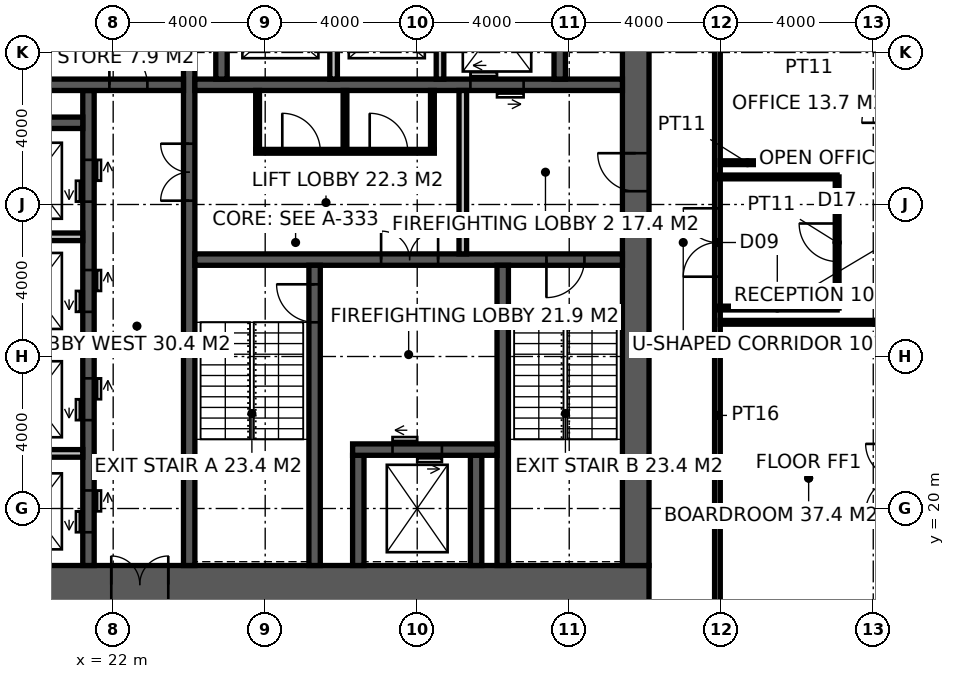
"""IFC4 building model, lengths in metres.
Left out: names, types, materials, properties, quantities, classifications, styles, units other than length and angle.
Written with IfcOpenShell. Run it as: python <this file> out.ifc"""

import sys

from ifc_helpers import new_model, si_unit, direction, frame, frame_2d, origin, place, context, subcontext, project, spatial, rectangle, extrude, element, fill, save


model = new_model("IFC4")
c1 = context("Model", 3, precision=1e-05, world=origin(), true_north=direction((0.0, 1.0)))
c2 = subcontext(c1, "Body", "Model", "MODEL_VIEW")
j1 = project(units=[si_unit("LENGTHUNIT", "METRE"), si_unit("PLANEANGLEUNIT", "RADIAN")], contexts=[c1])
p1 = place(None, origin())
s1 = spatial("IfcSite", under=j1, at=p1, CompositionType="ELEMENT")
p2 = place(p1, origin())
s2 = spatial("IfcBuilding", under=s1, at=p2, CompositionType="ELEMENT")
p3 = place(p2, frame((0.0, 0.0, 199.8)))
s3 = spatial("IfcBuildingStorey", under=s2, at=p3, CompositionType="ELEMENT", Elevation=199.8)
p4 = place(p3, frame((18.5, 18.0, -0.15), z_axis=(0.0, 0.0, 1.0), x_axis=(1.0, 0.0, 0.0)))
e1 = element("IfcWall", 1, at=p4, inside=s3, PredefinedType="SHEAR", context=c2, shape_type="SweptSolid", body=[
    extrude(rectangle(XDim=17.6, YDim=1.0, at=frame_2d((8.8, 0.0))), origin(), (0.0, 0.0, 1.0), 4.0),
])
p5 = place(p4, frame((3.45, 0.0, 0.15)))
e2 = element("IfcOpeningElement", 2, at=p5, cuts=e1, PredefinedType="OPENING", context=c2, shape_type="SweptSolid", body=[
    extrude(rectangle(XDim=1.5, YDim=2.4, at=frame_2d((0.75, 1.2))), frame((0.0, 0.51, 0.0), z_axis=(0.0, -1.0, 0.0), x_axis=(1.0, 0.0, 0.0)), (0.0, 0.0, 1.0), 1.02),
])
p6 = place(p3, frame((35.75, 18.5, -0.15), z_axis=(0.0, 0.0, 1.0), x_axis=(0.0, 1.0, 0.0)))
e3 = element("IfcWall", 3, at=p6, inside=s3, PredefinedType="SHEAR", context=c2, shape_type="SweptSolid", body=[
    extrude(rectangle(XDim=17.0, YDim=0.7, at=frame_2d((8.5, 0.0))), origin(), (0.0, 0.0, 1.0), 4.0),
])
p7 = place(p6, frame((9.85, 0.0, 0.15)))
e4 = element("IfcOpeningElement", 4, at=p7, cuts=e3, PredefinedType="OPENING", context=c2, shape_type="SweptSolid", body=[
    extrude(rectangle(XDim=1.0, YDim=2.2, at=frame_2d((0.5, 1.1))), frame((0.0, 0.36, 0.0), z_axis=(0.0, -1.0, 0.0), x_axis=(1.0, 0.0, 0.0)), (0.0, 0.0, 1.0), 0.72),
])
p8 = place(p3, frame((24.0, 18.5, -0.15), z_axis=(0.0, 0.0, 1.0), x_axis=(0.0, 1.0, 0.0)))
e5 = element("IfcWall", 5, at=p8, inside=s3, PredefinedType="SHEAR", context=c2, shape_type="SweptSolid", body=[
    extrude(rectangle(XDim=17.0, YDim=0.3, at=frame_2d((8.5, 0.0))), origin(), (0.0, 0.0, 1.0), 4.0),
])
p9 = place(p8, frame((9.6, 0.0, 0.15)))
e6 = element("IfcOpeningElement", 6, at=p9, cuts=e5, PredefinedType="OPENING", context=c2, shape_type="SweptSolid", body=[
    extrude(rectangle(XDim=1.5, YDim=2.4, at=frame_2d((0.75, 1.2))), frame((0.0, 0.16, 0.0), z_axis=(0.0, -1.0, 0.0), x_axis=(1.0, 0.0, 0.0)), (0.0, 0.0, 1.0), 0.32),
])
p10 = place(p3, frame((24.15, 26.55, -0.15), z_axis=(0.0, 0.0, 1.0), x_axis=(1.0, 0.0, 0.0)))
e7 = element("IfcWall", 7, at=p10, inside=s3, PredefinedType="SHEAR", context=c2, shape_type="SweptSolid", body=[
    extrude(rectangle(XDim=11.25, YDim=0.3, at=frame_2d((5.625, 0.0))), origin(), (0.0, 0.0, 1.0), 4.0),
])
p11 = place(p10, frame((9.25, 0.0, 0.15)))
e8 = element("IfcOpeningElement", 8, at=p11, cuts=e7, PredefinedType="OPENING", context=c2, shape_type="SweptSolid", body=[
    extrude(rectangle(XDim=1.0, YDim=2.2, at=frame_2d((0.5, 1.1))), frame((0.0, 0.16, 0.0), z_axis=(0.0, -1.0, 0.0), x_axis=(1.0, 0.0, 0.0)), (0.0, 0.0, 1.0), 0.32),
])
p12 = place(p10, frame((4.9, 0.0, 0.15)))
e9 = element("IfcOpeningElement", 9, at=p12, cuts=e7, PredefinedType="OPENING", context=c2, shape_type="SweptSolid", body=[
    extrude(rectangle(XDim=1.5, YDim=2.4, at=frame_2d((0.75, 1.2))), frame((0.0, 0.16, 0.0), z_axis=(0.0, -1.0, 0.0), x_axis=(1.0, 0.0, 0.0)), (0.0, 0.0, 1.0), 0.32),
])
p13 = place(p3, frame((27.3, 18.5, -0.15), z_axis=(0.0, 0.0, 1.0), x_axis=(0.0, 1.0, 0.0)))
e10 = element("IfcWall", 10, at=p13, inside=s3, PredefinedType="SHEAR", context=c2, shape_type="SweptSolid", body=[
    extrude(rectangle(XDim=7.9, YDim=0.3, at=frame_2d((3.95, 0.0))), origin(), (0.0, 0.0, 1.0), 4.0),
])
p14 = place(p13, frame((6.4, 0.0, 0.15)))
e11 = element("IfcOpeningElement", 11, at=p14, cuts=e10, PredefinedType="OPENING", context=c2, shape_type="SweptSolid", body=[
    extrude(rectangle(XDim=1.0, YDim=2.2, at=frame_2d((0.5, 1.1))), frame((0.0, 0.16, 0.0), z_axis=(0.0, -1.0, 0.0), x_axis=(1.0, 0.0, 0.0)), (0.0, 0.0, 1.0), 0.32),
])
p15 = place(p3, frame((32.25, 18.5, -0.15), z_axis=(0.0, 0.0, 1.0), x_axis=(0.0, 1.0, 0.0)))
e12 = element("IfcWall", 12, at=p15, inside=s3, PredefinedType="SHEAR", context=c2, shape_type="SweptSolid", body=[
    extrude(rectangle(XDim=7.9, YDim=0.3, at=frame_2d((3.95, 0.0))), origin(), (0.0, 0.0, 1.0), 4.0),
])
for number, where, z_axis, x_axis in (
    (13, (28.45, 18.5, -0.15), (0.0, 0.0, 1.0), (0.0, 1.0, 0.0)),
    (14, (31.55, 18.5, -0.15), (0.0, 0.0, 1.0), (0.0, 1.0, 0.0)),
):
    element("IfcWall", number, at=place(p3, frame(where, z_axis=z_axis, x_axis=x_axis)), inside=s3, PredefinedType="SHEAR", context=c2, shape_type="SweptSolid", body=[
        extrude(rectangle(XDim=2.9, YDim=0.3, at=frame_2d((1.45, 0.0))), origin(), (0.0, 0.0, 1.0), 4.0),
    ])
p16 = place(p3, frame((28.3, 21.55, -0.15), z_axis=(0.0, 0.0, 1.0), x_axis=(1.0, 0.0, 0.0)))
e15 = element("IfcWall", 15, at=p16, inside=s3, PredefinedType="SHEAR", context=c2, shape_type="SweptSolid", body=[
    extrude(rectangle(XDim=3.8, YDim=0.3, at=frame_2d((1.9, 0.0))), origin(), (0.0, 0.0, 1.0), 4.0),
])
p17 = place(p16, frame((1.05, 0.0, 0.15)))
e16 = element("IfcOpeningElement", 16, at=p17, cuts=e15, PredefinedType="OPENING", context=c2, shape_type="SweptSolid", body=[
    extrude(rectangle(XDim=1.3, YDim=2.4, at=frame_2d((0.65, 1.2))), frame((0.0, 0.16, 0.0), z_axis=(0.0, -1.0, 0.0), x_axis=(1.0, 0.0, 0.0)), (0.0, 0.0, 1.0), 0.32),
])
p18 = place(p3, frame((24.15, 31.15, -0.15), z_axis=(0.0, 0.0, 1.0), x_axis=(1.0, 0.0, 0.0)))
e17 = element("IfcWall", 17, at=p18, inside=s3, PredefinedType="SHEAR", context=c2, shape_type="SweptSolid", body=[
    extrude(rectangle(XDim=11.25, YDim=0.3, at=frame_2d((5.625, 0.0))), origin(), (0.0, 0.0, 1.0), 4.0),
])
p19 = place(p18, frame((7.25, 0.0, 0.15)))
e18 = element("IfcOpeningElement", 18, at=p19, cuts=e17, PredefinedType="OPENING", context=c2, shape_type="SweptSolid", body=[
    extrude(rectangle(XDim=1.4, YDim=2.4, at=frame_2d((0.7, 1.2))), frame((0.0, 0.16, 0.0), z_axis=(0.0, -1.0, 0.0), x_axis=(1.0, 0.0, 0.0)), (0.0, 0.0, 1.0), 0.32),
])
p20 = place(p3, frame((21.35, 18.5, -0.15), z_axis=(0.0, 0.0, 1.0), x_axis=(0.0, 1.0, 0.0)))
e19 = element("IfcWall", 19, at=p20, inside=s3, PredefinedType="SHEAR", context=c2, shape_type="SweptSolid", body=[
    extrude(rectangle(XDim=12.5, YDim=0.3, at=frame_2d((6.25, 0.0))), origin(), (0.0, 0.0, 1.0), 4.0),
])
p21 = place(p20, frame((0.875, 0.0, 0.15)))
e20 = element("IfcOpeningElement", 20, at=p21, cuts=e19, PredefinedType="OPENING", context=c2, shape_type="SweptSolid", body=[
    extrude(rectangle(XDim=1.1, YDim=2.2, at=frame_2d((0.55, 1.1))), frame((0.0, 0.16, 0.0), z_axis=(0.0, -1.0, 0.0), x_axis=(1.0, 0.0, 0.0)), (0.0, 0.0, 1.0), 0.32),
])
p22 = place(p20, frame((3.825, 0.0, 0.15)))
e21 = element("IfcOpeningElement", 21, at=p22, cuts=e19, PredefinedType="OPENING", context=c2, shape_type="SweptSolid", body=[
    extrude(rectangle(XDim=1.1, YDim=2.2, at=frame_2d((0.55, 1.1))), frame((0.0, 0.16, 0.0), z_axis=(0.0, -1.0, 0.0), x_axis=(1.0, 0.0, 0.0)), (0.0, 0.0, 1.0), 0.32),
])
p23 = place(p20, frame((6.675, 0.0, 0.15)))
e22 = element("IfcOpeningElement", 22, at=p23, cuts=e19, PredefinedType="OPENING", context=c2, shape_type="SweptSolid", body=[
    extrude(rectangle(XDim=1.1, YDim=2.2, at=frame_2d((0.55, 1.1))), frame((0.0, 0.16, 0.0), z_axis=(0.0, -1.0, 0.0), x_axis=(1.0, 0.0, 0.0)), (0.0, 0.0, 1.0), 0.32),
])
p24 = place(p20, frame((9.575, 0.0, 0.15)))
e23 = element("IfcOpeningElement", 23, at=p24, cuts=e19, PredefinedType="OPENING", context=c2, shape_type="SweptSolid", body=[
    extrude(rectangle(XDim=1.1, YDim=2.2, at=frame_2d((0.55, 1.1))), frame((0.0, 0.16, 0.0), z_axis=(0.0, -1.0, 0.0), x_axis=(1.0, 0.0, 0.0)), (0.0, 0.0, 1.0), 0.32),
])
p25 = place(p3, frame((18.5, 31.15, -0.15), z_axis=(0.0, 0.0, 1.0), x_axis=(1.0, 0.0, 0.0)))
e24 = element("IfcWall", 24, at=p25, inside=s3, PredefinedType="SHEAR", context=c2, shape_type="SweptSolid", body=[
    extrude(rectangle(XDim=5.35, YDim=0.3, at=frame_2d((2.675, 0.0))), origin(), (0.0, 0.0, 1.0), 4.0),
])
p26 = place(p25, frame((3.4, 0.0, 0.15)))
e25 = element("IfcOpeningElement", 25, at=p26, cuts=e24, PredefinedType="OPENING", context=c2, shape_type="SweptSolid", body=[
    extrude(rectangle(XDim=1.0, YDim=2.2, at=frame_2d((0.5, 1.1))), frame((0.0, 0.16, 0.0), z_axis=(0.0, -1.0, 0.0), x_axis=(1.0, 0.0, 0.0)), (0.0, 0.0, 1.0), 0.32),
])
p27 = place(p3, frame((18.5, 30.15, -0.15), z_axis=(0.0, 0.0, 1.0), x_axis=(1.0, 0.0, 0.0)))
e26 = element("IfcWall", 26, at=p27, inside=s3, PredefinedType="SHEAR", context=c2, shape_type="SweptSolid", body=[
    extrude(rectangle(XDim=2.7, YDim=0.3, at=frame_2d((1.35, 0.0))), origin(), (0.0, 0.0, 1.0), 4.0),
])
for number, where, z_axis, x_axis in (
    (27, (24.85, 31.3, -0.15), (0.0, 0.0, 1.0), (0.0, 1.0, 0.0)),
    (28, (33.75, 31.3, -0.15), (0.0, 0.0, 1.0), (0.0, 1.0, 0.0)),
):
    element("IfcWall", number, at=place(p3, frame(where, z_axis=z_axis, x_axis=x_axis)), inside=s3, PredefinedType="SHEAR", context=c2, shape_type="SweptSolid", body=[
        extrude(rectangle(XDim=4.2, YDim=0.3, at=frame_2d((2.1, 0.0))), origin(), (0.0, 0.0, 1.0), 4.0),
    ])
for number, where, z_axis, x_axis in (
    (29, (27.8, 31.3, -0.15), (0.0, 0.0, 1.0), (0.0, 1.0, 0.0)),
    (30, (30.6, 31.3, -0.15), (0.0, 0.0, 1.0), (0.0, 1.0, 0.0)),
):
    element("IfcWall", number, at=place(p3, frame(where, z_axis=z_axis, x_axis=x_axis)), inside=s3, PredefinedType="SOLIDWALL", context=c2, shape_type="SweptSolid", body=[
        extrude(rectangle(XDim=2.8, YDim=0.2, at=frame_2d((1.4, 0.0))), origin(), (0.0, 0.0, 1.0), 4.0),
    ])
for number, where, z_axis, x_axis in (
    (31, (18.5, 21.45, -0.15), (0.0, 0.0, 1.0), (1.0, 0.0, 0.0)),
    (32, (18.5, 24.3, -0.15), (0.0, 0.0, 1.0), (1.0, 0.0, 0.0)),
    (33, (18.5, 27.15, -0.15), (0.0, 0.0, 1.0), (1.0, 0.0, 0.0)),
):
    element("IfcWall", number, at=place(p3, frame(where, z_axis=z_axis, x_axis=x_axis)), inside=s3, PredefinedType="SOLIDWALL", context=c2, shape_type="SweptSolid", body=[
        extrude(rectangle(XDim=2.7, YDim=0.2, at=frame_2d((1.35, 0.0))), origin(), (0.0, 0.0, 1.0), 4.0),
    ])
p28 = place(p3, frame((31.2, 26.7, 0.0), z_axis=(0.0, 0.0, 1.0), x_axis=(0.0, 1.0, 0.0)))
e34 = element("IfcWall", 34, at=p28, inside=s3, PredefinedType="SOLIDWALL", context=c2, shape_type="SweptSolid", body=[
    extrude(rectangle(XDim=4.3, YDim=0.2, at=frame_2d((2.15, 0.0))), origin(), (0.0, 0.0, 1.0), 3.85),
])
p29 = place(p3, frame((25.75, 29.4, 0.0), z_axis=(0.0, 0.0, 1.0), x_axis=(1.0, 0.0, 0.0)))
e35 = element("IfcWall", 35, at=p29, inside=s3, PredefinedType="PARTITIONING", context=c2, shape_type="SweptSolid", body=[
    extrude(rectangle(XDim=4.7, YDim=0.1, at=frame_2d((2.35, 0.0))), origin(), (0.0, 0.0, 1.0), 3.85),
])
p30 = place(p29, frame((0.7, 0.0, 0.0)))
e36 = element("IfcOpeningElement", 36, at=p30, cuts=e35, PredefinedType="OPENING", context=c2, shape_type="SweptSolid", body=[
    extrude(rectangle(XDim=1.0, YDim=2.2, at=frame_2d((0.5, 1.1))), frame((0.0, 0.06, 0.0), z_axis=(0.0, -1.0, 0.0), x_axis=(1.0, 0.0, 0.0)), (0.0, 0.0, 1.0), 0.12),
])
p31 = place(p29, frame((3.0, 0.0, 0.0)))
e37 = element("IfcOpeningElement", 37, at=p31, cuts=e35, PredefinedType="OPENING", context=c2, shape_type="SweptSolid", body=[
    extrude(rectangle(XDim=1.0, YDim=2.2, at=frame_2d((0.5, 1.1))), frame((0.0, 0.06, 0.0), z_axis=(0.0, -1.0, 0.0), x_axis=(1.0, 0.0, 0.0)), (0.0, 0.0, 1.0), 0.12),
])
for number, where, z_axis, x_axis in (
    (38, (25.8, 29.45, 0.0), (0.0, 0.0, 1.0), (0.0, 1.0, 0.0)),
    (39, (30.4, 29.45, 0.0), (0.0, 0.0, 1.0), (0.0, 1.0, 0.0)),
    (40, (28.1, 29.45, 0.0), (0.0, 0.0, 1.0), (0.0, 1.0, 0.0)),
):
    element("IfcWall", number, at=place(p3, frame(where, z_axis=z_axis, x_axis=x_axis)), inside=s3, PredefinedType="PARTITIONING", context=c2, shape_type="SweptSolid", body=[
        extrude(rectangle(XDim=1.55, YDim=0.1, at=frame_2d((0.775, 0.0))), origin(), (0.0, 0.0, 1.0), 3.85),
    ])
p32 = place(p3, frame((37.9, 15.625, 0.0), z_axis=(0.0, 0.0, 1.0), x_axis=(0.0, 1.0, 0.0)))
e41 = element("IfcWall", 41, at=p32, inside=s3, PredefinedType="PARTITIONING", context=c2, shape_type="SweptSolid", body=[
    extrude(rectangle(XDim=22.75, YDim=0.15, at=frame_2d((11.375, 0.0))), origin(), (0.0, 0.0, 1.0), 2.85),
])
p33 = place(p32, frame((10.475, 0.0, 0.0)))
e42 = element("IfcOpeningElement", 42, at=p33, cuts=e41, PredefinedType="OPENING", context=c2, shape_type="SweptSolid", body=[
    extrude(rectangle(XDim=1.8, YDim=2.4, at=frame_2d((0.9, 1.2))), frame((0.0, 0.085, 0.0), z_axis=(0.0, -1.0, 0.0), x_axis=(1.0, 0.0, 0.0)), (0.0, 0.0, 1.0), 0.17),
])
for number, where, z_axis, x_axis in (
    (43, (37.975, 24.9, 0.0), (0.0, 0.0, 1.0), (1.0, 0.0, 0.0)),
    (44, (37.975, 29.1, 0.0), (0.0, 0.0, 1.0), (1.0, 0.0, 0.0)),
):
    element("IfcWall", number, at=place(p3, frame(where, z_axis=z_axis, x_axis=x_axis)), inside=s3, PredefinedType="PARTITIONING", context=c2, shape_type="SweptSolid", body=[
        extrude(rectangle(XDim=4.775, YDim=0.1, at=frame_2d((2.387, 0.0))), origin(), (0.0, 0.0, 1.0), 3.85),
    ])
p34 = place(p3, frame((37.9, 25.275, 0.0), z_axis=(0.0, 0.0, 1.0), x_axis=(1.0, 0.0, 0.0)))
e45 = element("IfcWall", 45, at=p34, inside=s3, PredefinedType="PARTITIONING", context=c2, shape_type="SweptSolid", body=[
    extrude(rectangle(XDim=3.15, YDim=0.1, at=frame_2d((1.575, 0.0))), origin(), (0.0, 0.0, 1.0), 3.85),
])
p35 = place(p3, frame((41.05, 25.275, 0.0), z_axis=(0.0, 0.0, 1.0), x_axis=(0.0, 1.0, 0.0)))
e46 = element("IfcWall", 46, at=p35, inside=s3, PredefinedType="PARTITIONING", context=c2, shape_type="SweptSolid", body=[
    extrude(rectangle(XDim=3.45, YDim=0.1, at=frame_2d((1.725, 0.0))), origin(), (0.0, 0.0, 1.0), 3.85),
])
p36 = place(p35, frame((1.225, 0.0, 0.0)))
e47 = element("IfcOpeningElement", 47, at=p36, cuts=e46, PredefinedType="OPENING", context=c2, shape_type="SweptSolid", body=[
    extrude(rectangle(XDim=1.0, YDim=2.2, at=frame_2d((0.5, 1.1))), frame((0.0, 0.06, 0.0), z_axis=(0.0, -1.0, 0.0), x_axis=(1.0, 0.0, 0.0)), (0.0, 0.0, 1.0), 0.12),
])
p37 = place(p3, frame((41.05, 28.725, 0.0), z_axis=(0.0, 0.0, 1.0), x_axis=(-1.0, 0.0, 0.0)))
e48 = element("IfcWall", 48, at=p37, inside=s3, PredefinedType="PARTITIONING", context=c2, shape_type="SweptSolid", body=[
    extrude(rectangle(XDim=3.15, YDim=0.1, at=frame_2d((1.575, 0.0))), origin(), (0.0, 0.0, 1.0), 3.85),
])
p38 = place(p14, origin())
e49 = element("IfcDoor", 49, at=p38, inside=s3, OperationType="SINGLE_SWING_RIGHT", PredefinedType="DOOR", context=c2, shape_type="SweptSolid", body=[
    extrude(rectangle(XDim=1.0, YDim=2.2, at=frame_2d((0.5, 1.1))), frame((0.0, 0.025, 0.0), z_axis=(0.0, -1.0, 0.0), x_axis=(1.0, 0.0, 0.0)), (0.0, 0.0, 1.0), 0.05),
])
fill(e11, e49)
p39 = place(p11, frame((1.0, 0.0, 0.0), z_axis=(0.0, 0.0, 1.0), x_axis=(-1.0, 0.0, 0.0)))
e50 = element("IfcDoor", 50, at=p39, inside=s3, OperationType="SINGLE_SWING_RIGHT", PredefinedType="DOOR", context=c2, shape_type="SweptSolid", body=[
    extrude(rectangle(XDim=1.0, YDim=2.2, at=frame_2d((0.5, 1.1))), frame((0.0, 0.025, 0.0), z_axis=(0.0, -1.0, 0.0), x_axis=(1.0, 0.0, 0.0)), (0.0, 0.0, 1.0), 0.05),
])
fill(e8, e50)
p40 = place(p7, origin())
e51 = element("IfcDoor", 51, at=p40, inside=s3, OperationType="SINGLE_SWING_RIGHT", PredefinedType="DOOR", context=c2, shape_type="SweptSolid", body=[
    extrude(rectangle(XDim=1.0, YDim=2.2, at=frame_2d((0.5, 1.1))), frame((0.0, 0.025, 0.0), z_axis=(0.0, -1.0, 0.0), x_axis=(1.0, 0.0, 0.0)), (0.0, 0.0, 1.0), 0.05),
])
fill(e4, e51)
p41 = place(p12, origin())
e52 = element("IfcDoor", 52, at=p41, inside=s3, OperationType="DOUBLE_DOOR_DOUBLE_SWING", PredefinedType="DOOR", context=c2, shape_type="SweptSolid", body=[
    extrude(rectangle(XDim=1.5, YDim=2.4, at=frame_2d((0.75, 1.2))), frame((0.0, 0.025, 0.0), z_axis=(0.0, -1.0, 0.0), x_axis=(1.0, 0.0, 0.0)), (0.0, 0.0, 1.0), 0.05),
])
fill(e9, e52)
p42 = place(p9, origin())
e53 = element("IfcDoor", 53, at=p42, inside=s3, OperationType="DOUBLE_DOOR_DOUBLE_SWING", PredefinedType="DOOR", context=c2, shape_type="SweptSolid", body=[
    extrude(rectangle(XDim=1.5, YDim=2.4, at=frame_2d((0.75, 1.2))), frame((0.0, 0.025, 0.0), z_axis=(0.0, -1.0, 0.0), x_axis=(1.0, 0.0, 0.0)), (0.0, 0.0, 1.0), 0.05),
])
fill(e6, e53)
p43 = place(p26, origin())
e54 = element("IfcDoor", 54, at=p43, inside=s3, OperationType="SINGLE_SWING_LEFT", PredefinedType="DOOR", context=c2, shape_type="SweptSolid", body=[
    extrude(rectangle(XDim=1.0, YDim=2.2, at=frame_2d((0.5, 1.1))), frame((0.0, 0.025, 0.0), z_axis=(0.0, -1.0, 0.0), x_axis=(1.0, 0.0, 0.0)), (0.0, 0.0, 1.0), 0.05),
])
fill(e25, e54)
p44 = place(p30, origin())
e55 = element("IfcDoor", 55, at=p44, inside=s3, OperationType="SINGLE_SWING_LEFT", PredefinedType="DOOR", context=c2, shape_type="SweptSolid", body=[
    extrude(rectangle(XDim=1.0, YDim=2.2, at=frame_2d((0.5, 1.1))), frame((0.0, 0.025, 0.0), z_axis=(0.0, -1.0, 0.0), x_axis=(1.0, 0.0, 0.0)), (0.0, 0.0, 1.0), 0.05),
])
fill(e36, e55)
p45 = place(p31, origin())
e56 = element("IfcDoor", 56, at=p45, inside=s3, OperationType="SINGLE_SWING_LEFT", PredefinedType="DOOR", context=c2, shape_type="SweptSolid", body=[
    extrude(rectangle(XDim=1.0, YDim=2.2, at=frame_2d((0.5, 1.1))), frame((0.0, 0.025, 0.0), z_axis=(0.0, -1.0, 0.0), x_axis=(1.0, 0.0, 0.0)), (0.0, 0.0, 1.0), 0.05),
])
fill(e37, e56)
p46 = place(p5, origin())
e57 = element("IfcDoor", 57, at=p46, inside=s3, OperationType="DOUBLE_DOOR_DOUBLE_SWING", PredefinedType="DOOR", context=c2, shape_type="SweptSolid", body=[
    extrude(rectangle(XDim=1.5, YDim=2.4, at=frame_2d((0.75, 1.2))), frame((0.0, 0.025, 0.0), z_axis=(0.0, -1.0, 0.0), x_axis=(1.0, 0.0, 0.0)), (0.0, 0.0, 1.0), 0.05),
])
fill(e2, e57)
p47 = place(p33, origin())
e58 = element("IfcDoor", 58, at=p47, inside=s3, OperationType="DOUBLE_DOOR_DOUBLE_SWING", PredefinedType="DOOR", context=c2, shape_type="SweptSolid", body=[
    extrude(rectangle(XDim=1.8, YDim=2.4, at=frame_2d((0.9, 1.2))), frame((0.0, 0.025, 0.0), z_axis=(0.0, -1.0, 0.0), x_axis=(1.0, 0.0, 0.0)), (0.0, 0.0, 1.0), 0.05),
])
fill(e42, e58)
p48 = place(p36, origin())
e59 = element("IfcDoor", 59, at=p48, inside=s3, OperationType="SINGLE_SWING_RIGHT", PredefinedType="DOOR", context=c2, shape_type="SweptSolid", body=[
    extrude(rectangle(XDim=1.0, YDim=2.2, at=frame_2d((0.5, 1.1))), frame((0.0, 0.025, 0.0), z_axis=(0.0, -1.0, 0.0), x_axis=(1.0, 0.0, 0.0)), (0.0, 0.0, 1.0), 0.05),
])
fill(e47, e59)
p49 = place(p17, origin())
e60 = element("IfcDoor", 60, at=p49, inside=s3, OperationType="DOUBLE_DOOR_SLIDING", PredefinedType="DOOR", context=c2, shape_type="SweptSolid", body=[
    extrude(rectangle(XDim=1.3, YDim=2.4, at=frame_2d((0.65, 1.2))), frame((0.0, 0.025, 0.0), z_axis=(0.0, -1.0, 0.0), x_axis=(1.0, 0.0, 0.0)), (0.0, 0.0, 1.0), 0.05),
])
fill(e16, e60)
p50 = place(p19, origin())
e61 = element("IfcDoor", 61, at=p50, inside=s3, OperationType="DOUBLE_DOOR_SLIDING", PredefinedType="DOOR", context=c2, shape_type="SweptSolid", body=[
    extrude(rectangle(XDim=1.4, YDim=2.4, at=frame_2d((0.7, 1.2))), frame((0.0, 0.025, 0.0), z_axis=(0.0, -1.0, 0.0), x_axis=(1.0, 0.0, 0.0)), (0.0, 0.0, 1.0), 0.05),
])
fill(e18, e61)
p51 = place(p21, origin())
e62 = element("IfcDoor", 62, at=p51, inside=s3, OperationType="DOUBLE_DOOR_SLIDING", PredefinedType="DOOR", context=c2, shape_type="SweptSolid", body=[
    extrude(rectangle(XDim=1.1, YDim=2.2, at=frame_2d((0.55, 1.1))), frame((0.0, 0.025, 0.0), z_axis=(0.0, -1.0, 0.0), x_axis=(1.0, 0.0, 0.0)), (0.0, 0.0, 1.0), 0.05),
])
fill(e20, e62)
p52 = place(p22, origin())
e63 = element("IfcDoor", 63, at=p52, inside=s3, OperationType="DOUBLE_DOOR_SLIDING", PredefinedType="DOOR", context=c2, shape_type="SweptSolid", body=[
    extrude(rectangle(XDim=1.1, YDim=2.2, at=frame_2d((0.55, 1.1))), frame((0.0, 0.025, 0.0), z_axis=(0.0, -1.0, 0.0), x_axis=(1.0, 0.0, 0.0)), (0.0, 0.0, 1.0), 0.05),
])
fill(e21, e63)
p53 = place(p23, origin())
e64 = element("IfcDoor", 64, at=p53, inside=s3, OperationType="DOUBLE_DOOR_SLIDING", PredefinedType="DOOR", context=c2, shape_type="SweptSolid", body=[
    extrude(rectangle(XDim=1.1, YDim=2.2, at=frame_2d((0.55, 1.1))), frame((0.0, 0.025, 0.0), z_axis=(0.0, -1.0, 0.0), x_axis=(1.0, 0.0, 0.0)), (0.0, 0.0, 1.0), 0.05),
])
fill(e22, e64)
p54 = place(p24, origin())
e65 = element("IfcDoor", 65, at=p54, inside=s3, OperationType="DOUBLE_DOOR_SLIDING", PredefinedType="DOOR", context=c2, shape_type="SweptSolid", body=[
    extrude(rectangle(XDim=1.1, YDim=2.2, at=frame_2d((0.55, 1.1))), frame((0.0, 0.025, 0.0), z_axis=(0.0, -1.0, 0.0), x_axis=(1.0, 0.0, 0.0)), (0.0, 0.0, 1.0), 0.05),
])
fill(e23, e65)
save(model, sys.argv[1])
